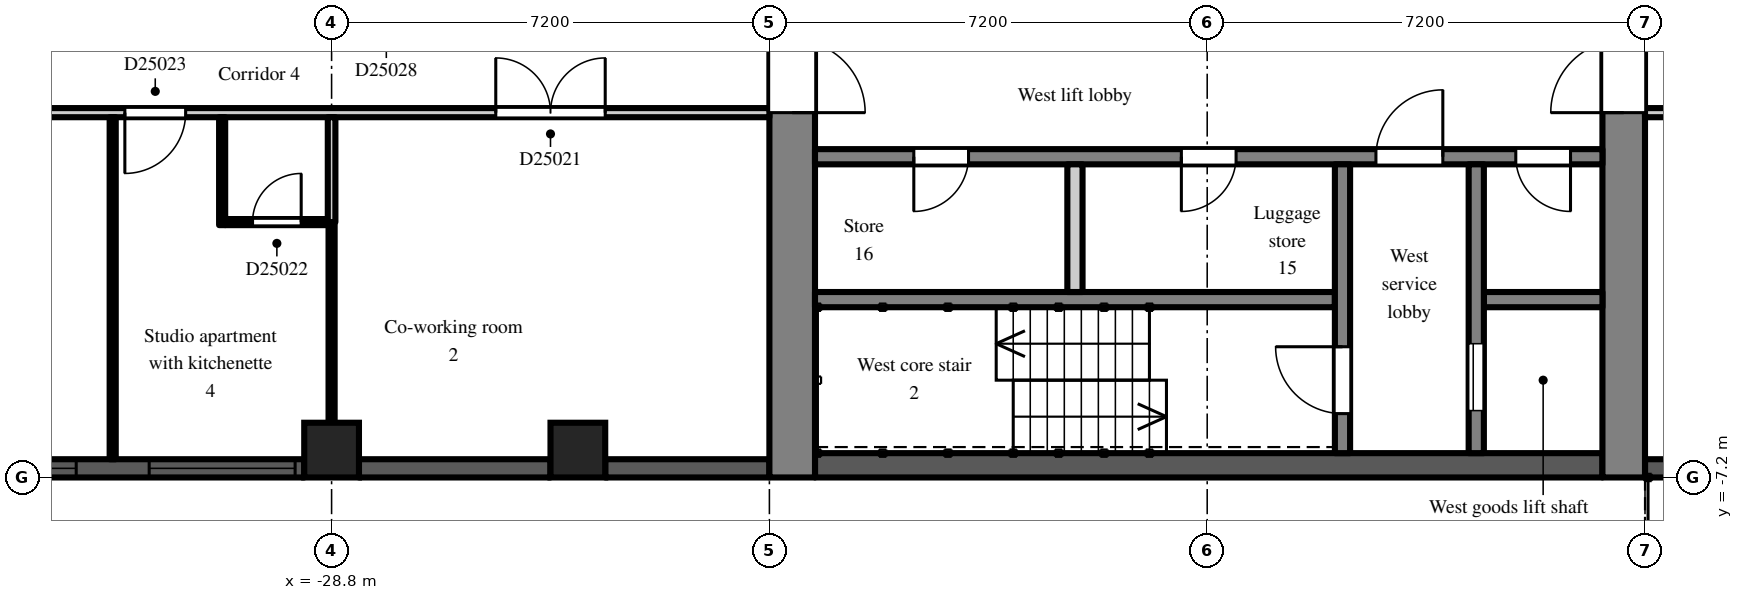
"""IFC4 building model, lengths in metres.
Left out: names, types, materials, properties, quantities, classifications, styles, units other than length and angle.
Written with IfcOpenShell. Run it as: python <this file> out.ifc"""

import sys

from ifc_helpers import new_model, si_unit, direction, frame, frame_2d, origin, origin_2d, place, context, subcontext, project, spatial, rectangle, extrude, element, fill, save


model = new_model("IFC4")
c1 = context("Model", 3, precision=1e-05, world=origin(), true_north=direction((0.0, 1.0)))
c2 = subcontext(c1, "Body", "Model", "MODEL_VIEW")
j1 = project(units=[si_unit("LENGTHUNIT", "METRE"), si_unit("PLANEANGLEUNIT", "RADIAN")], contexts=[c1])
p1 = place(None, origin())
s1 = spatial("IfcSite", under=j1, at=p1, CompositionType="ELEMENT")
p2 = place(p1, origin())
s2 = spatial("IfcBuilding", under=s1, at=p2, CompositionType="ELEMENT")
p3 = place(p2, frame((0.0, 0.0, 170.7)))
s3 = spatial("IfcBuildingStorey", under=s2, at=p3, CompositionType="ELEMENT", Elevation=170.7)
for number, where, z_axis, x_axis in (
    (1, (-28.8, -6.75, 0.0), (0.0, 0.0, 1.0), (1.0, 0.0, 0.0)),
    (2, (-24.75, -6.75, 0.0), (0.0, 0.0, 1.0), (1.0, 0.0, 0.0)),
):
    element("IfcColumn", number, at=place(p3, frame(where, z_axis=z_axis, x_axis=x_axis)), inside=s3, PredefinedType="COLUMN", context=c2, shape_type="SweptSolid", body=[
        extrude(rectangle(XDim=0.9, YDim=0.9, at=origin_2d()), origin(), (0.0, 0.0, 1.0), 3.0),
    ])
p4 = place(p3, frame((-35.55, -7.05, 0.0), z_axis=(0.0, 0.0, 1.0), x_axis=(1.0, 0.0, 0.0)))
e3 = element("IfcWall", 3, at=p4, inside=s3, PredefinedType="SOLIDWALL", context=c2, shape_type="SweptSolid", body=[
    extrude(rectangle(XDim=6.3, YDim=0.3, at=frame_2d((3.15, 0.0))), origin(), (0.0, 0.0, 1.0), 2.2),
])
p5 = place(p4, frame((0.15, 0.0, 0.2)))
e4 = element("IfcOpeningElement", 4, at=p5, cuts=e3, PredefinedType="OPENING", context=c2, shape_type="SweptSolid", body=[
    extrude(rectangle(XDim=2.4, YDim=1.85, at=frame_2d((1.2, 0.925))), frame((0.0, 0.16, 0.0), z_axis=(0.0, -1.0, 0.0), x_axis=(1.0, 0.0, 0.0)), (0.0, 0.0, 1.0), 0.32),
])
p6 = place(p4, frame((3.75, 0.0, 0.2)))
e5 = element("IfcOpeningElement", 5, at=p6, cuts=e3, PredefinedType="OPENING", context=c2, shape_type="SweptSolid", body=[
    extrude(rectangle(XDim=2.4, YDim=1.85, at=frame_2d((1.2, 0.925))), frame((0.0, 0.16, 0.0), z_axis=(0.0, -1.0, 0.0), x_axis=(1.0, 0.0, 0.0)), (0.0, 0.0, 1.0), 0.32),
])
p7 = place(p3, frame((-28.35, -7.05, 0.0), z_axis=(0.0, 0.0, 1.0), x_axis=(1.0, 0.0, 0.0)))
e6 = element("IfcWall", 6, at=p7, inside=s3, PredefinedType="SOLIDWALL", context=c2, shape_type="SweptSolid", body=[
    extrude(rectangle(XDim=3.15, YDim=0.3, at=frame_2d((1.575, 0.0))), origin(), (0.0, 0.0, 1.0), 2.2),
])
p8 = place(p3, frame((-24.3, -7.05, 0.0), z_axis=(0.0, 0.0, 1.0), x_axis=(1.0, 0.0, 0.0)))
e7 = element("IfcWall", 7, at=p8, inside=s3, PredefinedType="SOLIDWALL", context=c2, shape_type="SweptSolid", body=[
    extrude(rectangle(XDim=2.7, YDim=0.3, at=frame_2d((1.35, 0.0))), origin(), (0.0, 0.0, 1.0), 2.2),
])
p9 = place(p3, frame((-7.2, -7.05, 0.0), z_axis=(0.0, 0.0, 1.0), x_axis=(1.0, 0.0, 0.0)))
e8 = element("IfcWall", 8, at=p9, inside=s3, PredefinedType="SOLIDWALL", context=c2, shape_type="SweptSolid", body=[
    extrude(rectangle(XDim=3.0, YDim=0.3, at=frame_2d((1.5, 0.0))), origin(), (0.0, 0.0, 1.0), 2.2),
])
p10 = place(p3, frame((-7.55, -7.2, 0.0), z_axis=(0.0, 0.0, 1.0), x_axis=(0.0, 1.0, 0.0)))
e9 = element("IfcWall", 9, at=p10, inside=s3, PredefinedType="SHEAR", context=c2, shape_type="SweptSolid", body=[
    extrude(rectangle(XDim=14.4, YDim=0.7, at=frame_2d((7.2, 0.0))), origin(), (0.0, 0.0, 1.0), 2.6),
])
p11 = place(p10, frame((6.0, 0.0, 0.0)))
e10 = element("IfcOpeningElement", 10, at=p11, cuts=e9, PredefinedType="OPENING", context=c2, shape_type="SweptSolid", body=[
    extrude(rectangle(XDim=2.4, YDim=2.2, at=frame_2d((1.2, 1.1))), frame((0.0, 0.36, 0.0), z_axis=(0.0, -1.0, 0.0), x_axis=(1.0, 0.0, 0.0)), (0.0, 0.0, 1.0), 0.72),
])
p12 = place(p3, frame((-21.225, -7.2, 0.0), z_axis=(0.0, 0.0, 1.0), x_axis=(0.0, 1.0, 0.0)))
e11 = element("IfcWall", 11, at=p12, inside=s3, PredefinedType="SHEAR", context=c2, shape_type="SweptSolid", body=[
    extrude(rectangle(XDim=14.4, YDim=0.75, at=frame_2d((7.2, 0.0))), origin(), (0.0, 0.0, 1.0), 2.6),
])
p13 = place(p12, frame((6.0, 0.0, 0.0)))
e12 = element("IfcOpeningElement", 12, at=p13, cuts=e11, PredefinedType="OPENING", context=c2, shape_type="SweptSolid", body=[
    extrude(rectangle(XDim=2.4, YDim=2.2, at=frame_2d((1.2, 1.1))), frame((0.0, 0.385, 0.0), z_axis=(0.0, -1.0, 0.0), x_axis=(1.0, 0.0, 0.0)), (0.0, 0.0, 1.0), 0.77),
])
p14 = place(p3, frame((-7.9, -7.0, 0.0), z_axis=(0.0, 0.0, 1.0), x_axis=(-1.0, 0.0, 0.0)))
e13 = element("IfcWall", 13, at=p14, inside=s3, PredefinedType="SHEAR", context=c2, shape_type="SweptSolid", body=[
    extrude(rectangle(XDim=12.95, YDim=0.4, at=frame_2d((6.475, 0.0))), origin(), (0.0, 0.0, 1.0), 2.6),
])
p15 = place(p3, frame((-7.9, -1.925, 0.0), z_axis=(0.0, 0.0, 1.0), x_axis=(-1.0, 0.0, 0.0)))
e14 = element("IfcWall", 14, at=p15, inside=s3, PredefinedType="SHEAR", context=c2, shape_type="SweptSolid", body=[
    extrude(rectangle(XDim=12.95, YDim=0.25, at=frame_2d((6.475, 0.0))), origin(), (0.0, 0.0, 1.0), 2.6),
])
p16 = place(p15, frame((0.525, 0.0, 0.0)))
e15 = element("IfcOpeningElement", 15, at=p16, cuts=e14, PredefinedType="OPENING", context=c2, shape_type="SweptSolid", body=[
    extrude(rectangle(XDim=0.9, YDim=2.1, at=frame_2d((0.45, 1.05))), frame((0.0, 0.135, 0.0), z_axis=(0.0, -1.0, 0.0), x_axis=(1.0, 0.0, 0.0)), (0.0, 0.0, 1.0), 0.27),
])
p17 = place(p15, frame((2.625, 0.0, 0.0)))
e16 = element("IfcOpeningElement", 16, at=p17, cuts=e14, PredefinedType="OPENING", context=c2, shape_type="SweptSolid", body=[
    extrude(rectangle(XDim=1.1, YDim=2.1, at=frame_2d((0.55, 1.05))), frame((0.0, 0.135, 0.0), z_axis=(0.0, -1.0, 0.0), x_axis=(1.0, 0.0, 0.0)), (0.0, 0.0, 1.0), 0.27),
])
p18 = place(p15, frame((6.025, 0.0, 0.0)))
e17 = element("IfcOpeningElement", 17, at=p18, cuts=e14, PredefinedType="OPENING", context=c2, shape_type="SweptSolid", body=[
    extrude(rectangle(XDim=0.9, YDim=2.1, at=frame_2d((0.45, 1.05))), frame((0.0, 0.135, 0.0), z_axis=(0.0, -1.0, 0.0), x_axis=(1.0, 0.0, 0.0)), (0.0, 0.0, 1.0), 0.27),
])
p19 = place(p15, frame((10.425, 0.0, 0.0)))
e18 = element("IfcOpeningElement", 18, at=p19, cuts=e14, PredefinedType="OPENING", context=c2, shape_type="SweptSolid", body=[
    extrude(rectangle(XDim=0.9, YDim=2.1, at=frame_2d((0.45, 1.05))), frame((0.0, 0.135, 0.0), z_axis=(0.0, -1.0, 0.0), x_axis=(1.0, 0.0, 0.0)), (0.0, 0.0, 1.0), 0.27),
])
p20 = place(p3, frame((-7.9, -4.275, 0.0), z_axis=(0.0, 0.0, 1.0), x_axis=(-1.0, 0.0, 0.0)))
e19 = element("IfcWall", 19, at=p20, inside=s3, PredefinedType="SHEAR", context=c2, shape_type="SweptSolid", body=[
    extrude(rectangle(XDim=1.95, YDim=0.25, at=frame_2d((0.975, 0.0))), origin(), (0.0, 0.0, 1.0), 2.6),
])
p21 = place(p3, frame((-12.3, -4.275, 0.0), z_axis=(0.0, 0.0, 1.0), x_axis=(-1.0, 0.0, 0.0)))
e20 = element("IfcWall", 20, at=p21, inside=s3, PredefinedType="SHEAR", context=c2, shape_type="SweptSolid", body=[
    extrude(rectangle(XDim=8.55, YDim=0.25, at=frame_2d((4.275, 0.0))), origin(), (0.0, 0.0, 1.0), 2.6),
])
p22 = place(p3, frame((-9.975, -2.05, 0.0), z_axis=(0.0, 0.0, 1.0), x_axis=(0.0, -1.0, 0.0)))
e21 = element("IfcWall", 21, at=p22, inside=s3, PredefinedType="SHEAR", context=c2, shape_type="SweptSolid", body=[
    extrude(rectangle(XDim=4.75, YDim=0.25, at=frame_2d((2.375, 0.0))), origin(), (0.0, 0.0, 1.0), 2.6),
])
p23 = place(p22, frame((2.95, 0.0, 0.0)))
e22 = element("IfcOpeningElement", 22, at=p23, cuts=e21, PredefinedType="OPENING", context=c2, shape_type="SweptSolid", body=[
    extrude(rectangle(XDim=1.1, YDim=2.1, at=frame_2d((0.55, 1.05))), frame((0.0, 0.135, 0.0), z_axis=(0.0, -1.0, 0.0), x_axis=(1.0, 0.0, 0.0)), (0.0, 0.0, 1.0), 0.27),
])
p24 = place(p3, frame((-12.175, -2.05, 0.0), z_axis=(0.0, 0.0, 1.0), x_axis=(0.0, -1.0, 0.0)))
e23 = element("IfcWall", 23, at=p24, inside=s3, PredefinedType="SHEAR", context=c2, shape_type="SweptSolid", body=[
    extrude(rectangle(XDim=4.75, YDim=0.25, at=frame_2d((2.375, 0.0))), origin(), (0.0, 0.0, 1.0), 2.6),
])
p25 = place(p24, frame((3.0, 0.0, 0.0)))
e24 = element("IfcOpeningElement", 24, at=p25, cuts=e23, PredefinedType="OPENING", context=c2, shape_type="SweptSolid", body=[
    extrude(rectangle(XDim=1.1, YDim=2.1, at=frame_2d((0.55, 1.05))), frame((0.0, 0.135, 0.0), z_axis=(0.0, -1.0, 0.0), x_axis=(1.0, 0.0, 0.0)), (0.0, 0.0, 1.0), 0.27),
])
p26 = place(p3, frame((-16.575, -2.05, 0.0), z_axis=(0.0, 0.0, 1.0), x_axis=(0.0, -1.0, 0.0)))
e25 = element("IfcWall", 25, at=p26, inside=s3, PredefinedType="PARTITIONING", context=c2, shape_type="SweptSolid", body=[
    extrude(rectangle(XDim=2.1, YDim=0.25, at=frame_2d((1.05, 0.0))), origin(), (0.0, 0.0, 1.0), 2.6),
])
p27 = place(p3, frame((-36.5, -1.2, 0.0), z_axis=(0.0, 0.0, 1.0), x_axis=(1.0, 0.0, 0.0)))
e26 = element("IfcWall", 26, at=p27, inside=s3, PredefinedType="PARTITIONING", context=c2, shape_type="SweptSolid", body=[
    extrude(rectangle(XDim=14.9, YDim=0.15, at=frame_2d((7.45, 0.0))), origin(), (0.0, 0.0, 1.0), 2.6),
])
p28 = place(p27, frame((10.4, 0.0, 0.0)))
e27 = element("IfcOpeningElement", 27, at=p28, cuts=e26, PredefinedType="OPENING", context=c2, shape_type="SweptSolid", body=[
    extrude(rectangle(XDim=1.8, YDim=2.1, at=frame_2d((0.9, 1.05))), frame((0.0, 0.085, 0.0), z_axis=(0.0, -1.0, 0.0), x_axis=(1.0, 0.0, 0.0)), (0.0, 0.0, 1.0), 0.17),
])
p29 = place(p27, frame((4.3, 0.0, 0.0)))
e28 = element("IfcOpeningElement", 28, at=p29, cuts=e26, PredefinedType="OPENING", context=c2, shape_type="SweptSolid", body=[
    extrude(rectangle(XDim=1.0, YDim=2.1, at=frame_2d((0.5, 1.05))), frame((0.0, 0.085, 0.0), z_axis=(0.0, -1.0, 0.0), x_axis=(1.0, 0.0, 0.0)), (0.0, 0.0, 1.0), 0.17),
])
p30 = place(p27, frame((1.15, 0.0, 0.0)))
e29 = element("IfcOpeningElement", 29, at=p30, cuts=e26, PredefinedType="OPENING", context=c2, shape_type="SweptSolid", body=[
    extrude(rectangle(XDim=1.8, YDim=2.1, at=frame_2d((0.9, 1.05))), frame((0.0, 0.085, 0.0), z_axis=(0.0, -1.0, 0.0), x_axis=(1.0, 0.0, 0.0)), (0.0, 0.0, 1.0), 0.17),
])
p31 = place(p3, frame((-32.4, -6.9, 0.0), z_axis=(0.0, 0.0, 1.0), x_axis=(0.0, 1.0, 0.0)))
e30 = element("IfcWall", 30, at=p31, inside=s3, PredefinedType="PARTITIONING", context=c2, shape_type="SweptSolid", body=[
    extrude(rectangle(XDim=5.625, YDim=0.1, at=frame_2d((2.812, 0.0))), origin(), (0.0, 0.0, 1.0), 2.6),
])
p32 = place(p3, frame((-30.6, -3.05, 0.0), z_axis=(0.0, 0.0, 1.0), x_axis=(0.0, 1.0, 0.0)))
e31 = element("IfcWall", 31, at=p32, inside=s3, PredefinedType="PARTITIONING", context=c2, shape_type="SweptSolid", body=[
    extrude(rectangle(XDim=1.775, YDim=0.1, at=frame_2d((0.888, 0.0))), origin(), (0.0, 0.0, 1.0), 2.6),
])
p33 = place(p3, frame((-30.55, -3.0, 0.0), z_axis=(0.0, 0.0, 1.0), x_axis=(1.0, 0.0, 0.0)))
e32 = element("IfcWall", 32, at=p33, inside=s3, PredefinedType="PARTITIONING", context=c2, shape_type="SweptSolid", body=[
    extrude(rectangle(XDim=1.688, YDim=0.1, at=frame_2d((0.844, 0.0))), origin(), (0.0, 0.0, 1.0), 2.6),
])
p34 = place(p33, frame((0.45, 0.0, 0.0)))
e33 = element("IfcOpeningElement", 33, at=p34, cuts=e32, PredefinedType="OPENING", context=c2, shape_type="SweptSolid", body=[
    extrude(rectangle(XDim=0.8, YDim=2.1, at=frame_2d((0.4, 1.05))), frame((0.0, 0.06, 0.0), z_axis=(0.0, -1.0, 0.0), x_axis=(1.0, 0.0, 0.0)), (0.0, 0.0, 1.0), 0.12),
])
p35 = place(p3, frame((-28.8, -6.9, 0.0), z_axis=(0.0, 0.0, 1.0), x_axis=(0.0, 1.0, 0.0)))
e34 = element("IfcWall", 34, at=p35, inside=s3, PredefinedType="PARTITIONING", context=c2, shape_type="SweptSolid", body=[
    extrude(rectangle(XDim=3.9, YDim=0.1, at=frame_2d((1.95, 0.0))), origin(), (0.0, 0.0, 1.0), 2.6),
])
p36 = place(p3, frame((-28.8, -3.0, 0.0), z_axis=(0.0, 0.0, 1.0), x_axis=(0.0, 1.0, 0.0)))
e35 = element("IfcWall", 35, at=p36, inside=s3, PredefinedType="PARTITIONING", context=c2, shape_type="SweptSolid", body=[
    extrude(rectangle(XDim=1.725, YDim=0.125, at=frame_2d((0.863, 0.0))), origin(), (0.0, 0.0, 1.0), 2.6),
])
p37 = place(p3, frame((-7.2, -1.2, 0.0), z_axis=(0.0, 0.0, 1.0), x_axis=(1.0, 0.0, 0.0)))
e36 = element("IfcWall", 36, at=p37, inside=s3, PredefinedType="PARTITIONING", context=c2, shape_type="SweptSolid", body=[
    extrude(rectangle(XDim=6.075, YDim=0.15, at=frame_2d((3.038, 0.0))), origin(), (0.0, 0.0, 1.0), 2.6),
])
p38 = place(p37, frame((1.95, 0.0, 0.0)))
e37 = element("IfcOpeningElement", 37, at=p38, cuts=e36, PredefinedType="OPENING", context=c2, shape_type="SweptSolid", body=[
    extrude(rectangle(XDim=0.9, YDim=2.1, at=frame_2d((0.45, 1.05))), frame((0.0, 0.085, 0.0), z_axis=(0.0, -1.0, 0.0), x_axis=(1.0, 0.0, 0.0)), (0.0, 0.0, 1.0), 0.17),
])
p39 = place(p5, origin())
e38 = element("IfcWindow", 38, at=p39, inside=s3, PartitioningType="SINGLE_PANEL", PredefinedType="WINDOW", context=c2, shape_type="SweptSolid", body=[
    extrude(rectangle(XDim=2.4, YDim=1.85, at=frame_2d((1.2, 0.925))), frame((0.0, 0.03, 0.0), z_axis=(0.0, -1.0, 0.0), x_axis=(1.0, 0.0, 0.0)), (0.0, 0.0, 1.0), 0.06),
])
fill(e4, e38)
p40 = place(p6, origin())
e39 = element("IfcWindow", 39, at=p40, inside=s3, PartitioningType="SINGLE_PANEL", PredefinedType="WINDOW", context=c2, shape_type="SweptSolid", body=[
    extrude(rectangle(XDim=2.4, YDim=1.85, at=frame_2d((1.2, 0.925))), frame((0.0, 0.03, 0.0), z_axis=(0.0, -1.0, 0.0), x_axis=(1.0, 0.0, 0.0)), (0.0, 0.0, 1.0), 0.06),
])
fill(e5, e39)
p41 = place(p23, origin())
e40 = element("IfcDoor", 40, at=p41, inside=s3, OperationType="SLIDING_TO_LEFT", PredefinedType="DOOR", context=c2, shape_type="SweptSolid", body=[
    extrude(rectangle(XDim=1.1, YDim=2.1, at=frame_2d((0.55, 1.05))), frame((0.0, 0.025, 0.0), z_axis=(0.0, -1.0, 0.0), x_axis=(1.0, 0.0, 0.0)), (0.0, 0.0, 1.0), 0.05),
])
fill(e22, e40)
p42 = place(p25, frame((1.1, 0.0, 0.0), z_axis=(0.0, 0.0, 1.0), x_axis=(-1.0, 0.0, 0.0)))
e41 = element("IfcDoor", 41, at=p42, inside=s3, OperationType="SINGLE_SWING_RIGHT", PredefinedType="DOOR", context=c2, shape_type="SweptSolid", body=[
    extrude(rectangle(XDim=1.1, YDim=2.1, at=frame_2d((0.55, 1.05))), frame((0.0, 0.025, 0.0), z_axis=(0.0, -1.0, 0.0), x_axis=(1.0, 0.0, 0.0)), (0.0, 0.0, 1.0), 0.05),
])
fill(e24, e41)
p43 = place(p16, origin())
e42 = element("IfcDoor", 42, at=p43, inside=s3, OperationType="SINGLE_SWING_LEFT", PredefinedType="DOOR", context=c2, shape_type="SweptSolid", body=[
    extrude(rectangle(XDim=0.9, YDim=2.1, at=frame_2d((0.45, 1.05))), frame((0.0, 0.025, 0.0), z_axis=(0.0, -1.0, 0.0), x_axis=(1.0, 0.0, 0.0)), (0.0, 0.0, 1.0), 0.05),
])
fill(e15, e42)
p44 = place(p17, frame((1.1, 0.0, 0.0), z_axis=(0.0, 0.0, 1.0), x_axis=(-1.0, 0.0, 0.0)))
e43 = element("IfcDoor", 43, at=p44, inside=s3, OperationType="SINGLE_SWING_RIGHT", PredefinedType="DOOR", context=c2, shape_type="SweptSolid", body=[
    extrude(rectangle(XDim=1.1, YDim=2.1, at=frame_2d((0.55, 1.05))), frame((0.0, 0.025, 0.0), z_axis=(0.0, -1.0, 0.0), x_axis=(1.0, 0.0, 0.0)), (0.0, 0.0, 1.0), 0.05),
])
fill(e16, e43)
p45 = place(p11, origin())
e44 = element("IfcDoor", 44, at=p45, inside=s3, OperationType="DOUBLE_DOOR_DOUBLE_SWING", PredefinedType="DOOR", context=c2, shape_type="SweptSolid", body=[
    extrude(rectangle(XDim=2.4, YDim=2.2, at=frame_2d((1.2, 1.1))), frame((0.0, 0.025, 0.0), z_axis=(0.0, -1.0, 0.0), x_axis=(1.0, 0.0, 0.0)), (0.0, 0.0, 1.0), 0.05),
])
fill(e10, e44)
p46 = place(p13, frame((2.4, 0.0, 0.0), z_axis=(0.0, 0.0, 1.0), x_axis=(-1.0, 0.0, 0.0)))
e45 = element("IfcDoor", 45, at=p46, inside=s3, OperationType="DOUBLE_DOOR_DOUBLE_SWING", PredefinedType="DOOR", context=c2, shape_type="SweptSolid", body=[
    extrude(rectangle(XDim=2.4, YDim=2.2, at=frame_2d((1.2, 1.1))), frame((0.0, 0.025, 0.0), z_axis=(0.0, -1.0, 0.0), x_axis=(1.0, 0.0, 0.0)), (0.0, 0.0, 1.0), 0.05),
])
fill(e12, e45)
p47 = place(p18, origin())
e46 = element("IfcDoor", 46, at=p47, inside=s3, OperationType="SINGLE_SWING_RIGHT", PredefinedType="DOOR", context=c2, shape_type="SweptSolid", body=[
    extrude(rectangle(XDim=0.9, YDim=2.1, at=frame_2d((0.45, 1.05))), frame((0.0, 0.025, 0.0), z_axis=(0.0, -1.0, 0.0), x_axis=(1.0, 0.0, 0.0)), (0.0, 0.0, 1.0), 0.05),
])
fill(e17, e46)
p48 = place(p19, origin())
e47 = element("IfcDoor", 47, at=p48, inside=s3, OperationType="SINGLE_SWING_RIGHT", PredefinedType="DOOR", context=c2, shape_type="SweptSolid", body=[
    extrude(rectangle(XDim=0.9, YDim=2.1, at=frame_2d((0.45, 1.05))), frame((0.0, 0.025, 0.0), z_axis=(0.0, -1.0, 0.0), x_axis=(1.0, 0.0, 0.0)), (0.0, 0.0, 1.0), 0.05),
])
fill(e18, e47)
p49 = place(p28, origin())
e48 = element("IfcDoor", 48, at=p49, inside=s3, OperationType="DOUBLE_DOOR_DOUBLE_SWING", PredefinedType="DOOR", context=c2, shape_type="SweptSolid", body=[
    extrude(rectangle(XDim=1.8, YDim=2.1, at=frame_2d((0.9, 1.05))), frame((0.0, 0.025, 0.0), z_axis=(0.0, -1.0, 0.0), x_axis=(1.0, 0.0, 0.0)), (0.0, 0.0, 1.0), 0.05),
])
fill(e27, e48)
p50 = place(p34, origin())
e49 = element("IfcDoor", 49, at=p50, inside=s3, OperationType="SINGLE_SWING_RIGHT", PredefinedType="DOOR", context=c2, shape_type="SweptSolid", body=[
    extrude(rectangle(XDim=0.8, YDim=2.1, at=frame_2d((0.4, 1.05))), frame((0.0, 0.025, 0.0), z_axis=(0.0, -1.0, 0.0), x_axis=(1.0, 0.0, 0.0)), (0.0, 0.0, 1.0), 0.05),
])
fill(e33, e49)
p51 = place(p29, frame((1.0, 0.0, 0.0), z_axis=(0.0, 0.0, 1.0), x_axis=(-1.0, 0.0, 0.0)))
e50 = element("IfcDoor", 50, at=p51, inside=s3, OperationType="SINGLE_SWING_RIGHT", PredefinedType="DOOR", context=c2, shape_type="SweptSolid", body=[
    extrude(rectangle(XDim=1.0, YDim=2.1, at=frame_2d((0.5, 1.05))), frame((0.0, 0.025, 0.0), z_axis=(0.0, -1.0, 0.0), x_axis=(1.0, 0.0, 0.0)), (0.0, 0.0, 1.0), 0.05),
])
fill(e28, e50)
save(model, sys.argv[1])
